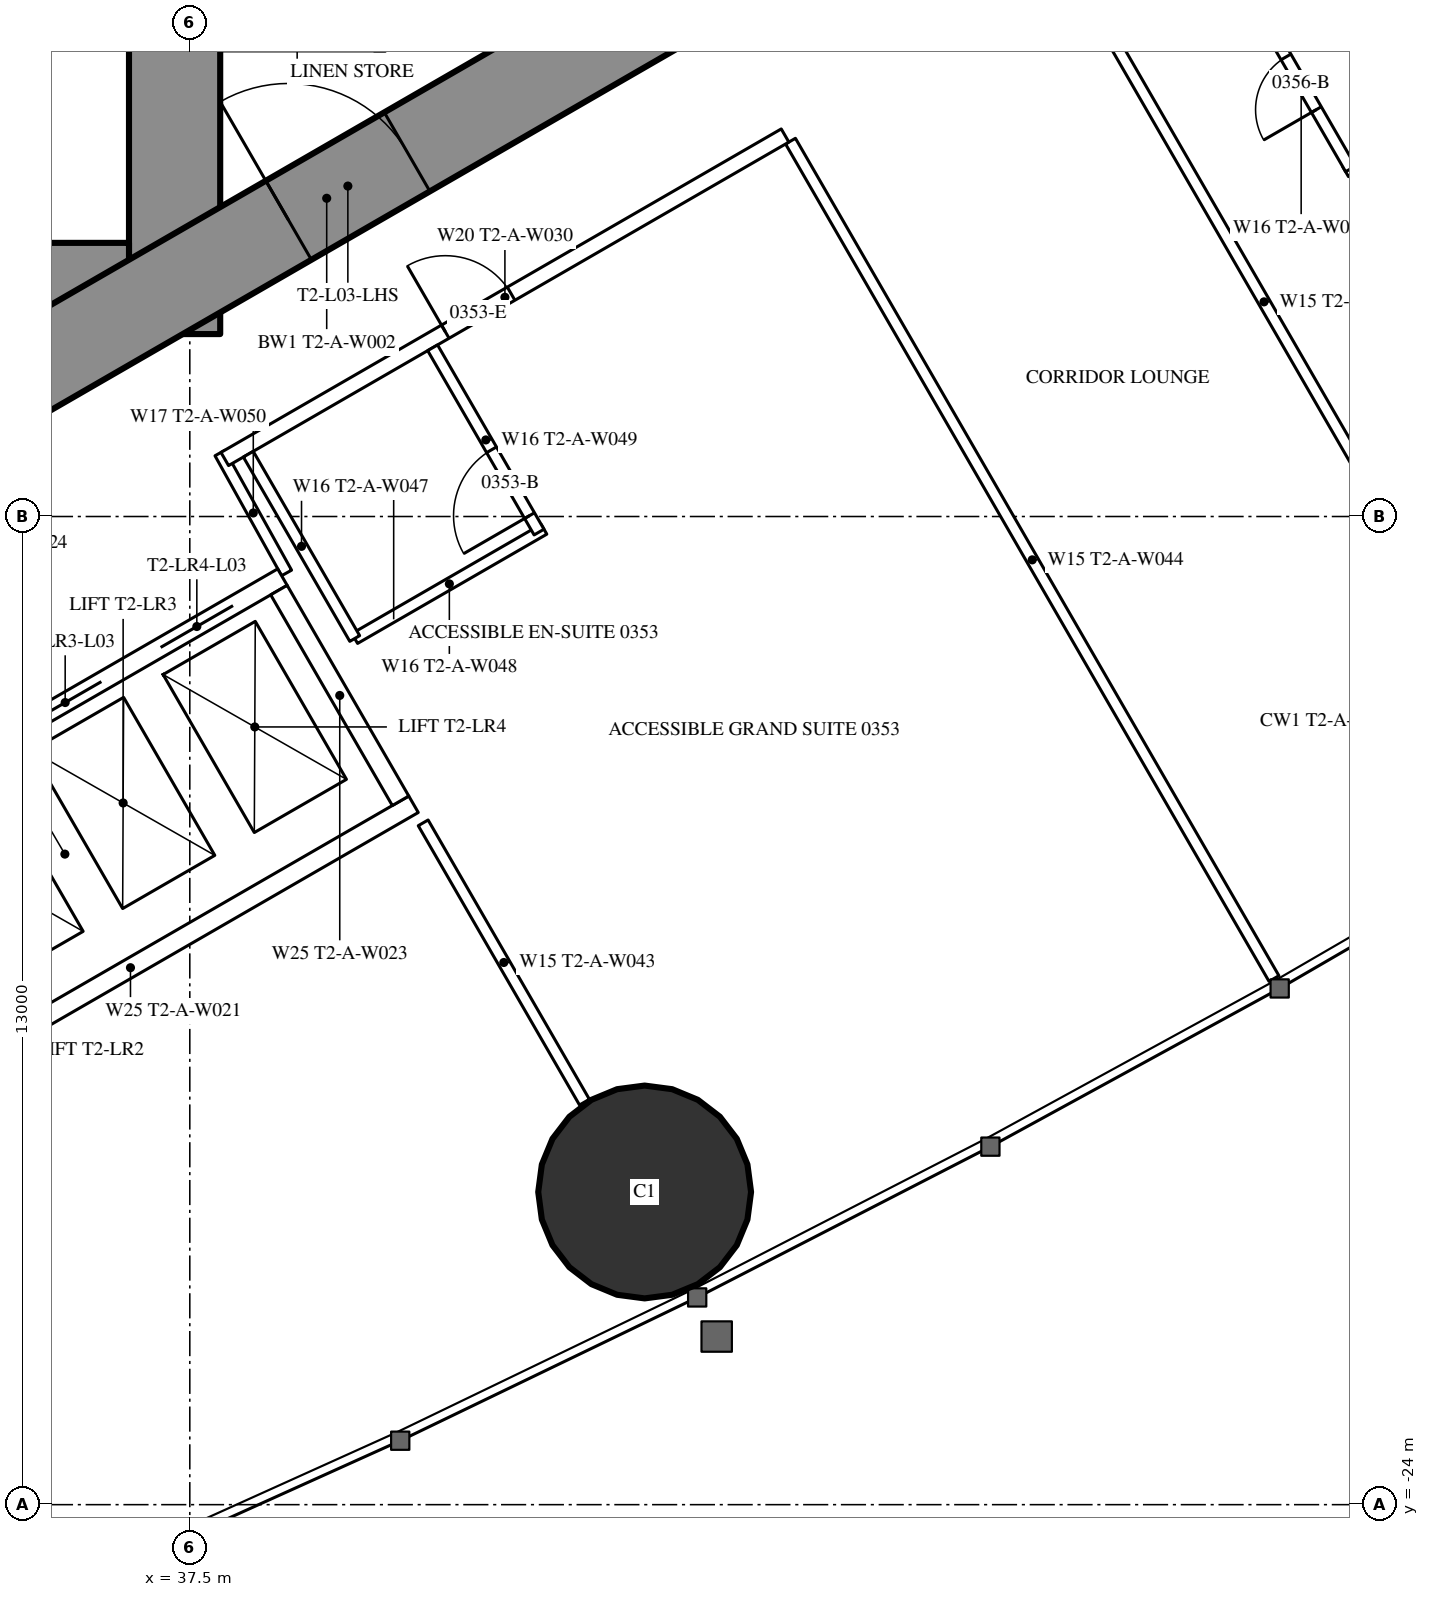
"""IFC4 building model, lengths in metres.
Left out: names, types, materials, properties, quantities, classifications, styles, units other than length and angle.
Written with IfcOpenShell. Run it as: python <this file> out.ifc"""

import sys

from ifc_helpers import new_model, si_unit, direction, frame, frame_2d, origin, origin_2d, place, context, subcontext, project, spatial, rectangle, hollow_circle, extrude, element, fill, save


model = new_model("IFC4")
c1 = context("Model", 3, precision=1e-05, world=origin(), true_north=direction((0.0, 1.0)))
c2 = subcontext(c1, "Body", "Model", "MODEL_VIEW")
j1 = project(units=[si_unit("LENGTHUNIT", "METRE"), si_unit("PLANEANGLEUNIT", "RADIAN")], contexts=[c1])
p1 = place(None, origin())
s1 = spatial("IfcSite", under=j1, at=p1, CompositionType="ELEMENT")
p2 = place(p1, origin())
s2 = spatial("IfcBuilding", under=s1, at=p2, CompositionType="ELEMENT")
p3 = place(p2, frame((0.0, 0.0, 18.0)))
s3 = spatial("IfcBuildingStorey", under=s2, at=p3, CompositionType="ELEMENT", Elevation=18.0)
p4 = place(p3, frame((43.484, -19.886, 0.0), z_axis=(0.0, 0.0, 1.0), x_axis=(1.0, 0.0, 0.0)))
e1 = element("IfcColumn", 1, at=p4, inside=s3, PredefinedType="COLUMN", context=c2, shape_type="SweptSolid", body=[
    extrude(hollow_circle(Radius=1.4, WallThickness=0.12, at=origin_2d()), origin(), (0.0, 0.0, 1.0), 3.5),
])
p5 = place(p3, frame((37.3, -8.6, 0.0), z_axis=(0.0, 0.0, 1.0), x_axis=(0.0, 1.0, 0.0)))
e2 = element("IfcWall", 2, at=p5, inside=s3, PredefinedType="SHEAR", context=c2, shape_type="SweptSolid", body=[
    extrude(rectangle(XDim=17.2, YDim=1.2, at=frame_2d((8.6, 0.0))), origin(), (0.0, 0.0, 1.0), 3.5),
])
p6 = place(p5, frame((7.7, 0.0, 0.0)))
e3 = element("IfcOpeningElement", 3, at=p6, cuts=e2, PredefinedType="OPENING", context=c2, shape_type="SweptSolid", body=[
    extrude(rectangle(XDim=1.8, YDim=2.2, at=frame_2d((0.9, 1.1))), frame((0.0, 0.61, 0.0), z_axis=(0.0, -1.0, 0.0), x_axis=(1.0, 0.0, 0.0)), (0.0, 0.0, 1.0), 1.22),
])
p7 = place(p3, frame((28.3, -8.0, 0.0), z_axis=(0.0, 0.0, 1.0), x_axis=(1.0, 0.0, 0.0)))
e4 = element("IfcWall", 4, at=p7, inside=s3, PredefinedType="SHEAR", context=c2, shape_type="SweptSolid", body=[
    extrude(rectangle(XDim=8.4, YDim=1.2, at=frame_2d((4.2, 0.0))), origin(), (0.0, 0.0, 1.0), 3.5),
])
p8 = place(p7, frame((0.25, 0.0, 0.0)))
e5 = element("IfcOpeningElement", 5, at=p8, cuts=e4, PredefinedType="OPENING", context=c2, shape_type="SweptSolid", body=[
    extrude(rectangle(XDim=1.0, YDim=2.2, at=frame_2d((0.5, 1.1))), frame((0.0, 0.61, 0.0), z_axis=(0.0, -1.0, 0.0), x_axis=(1.0, 0.0, 0.0)), (0.0, 0.0, 1.0), 1.22),
])
p9 = place(p3, frame((27.2, -13.8, 0.0), z_axis=(0.0, 0.0, 1.0), x_axis=(0.866027159892, 0.499996958321, 0.0)))
e6 = element("IfcWall", 6, at=p9, inside=s3, PredefinedType="SHEAR", context=c2, shape_type="SweptSolid", body=[
    extrude(rectangle(XDim=27.947, YDim=1.2, at=frame_2d((13.973, 0.0))), origin(), (0.0, 0.0, 1.0), 3.5),
])
p10 = place(p9, frame((4.6, 0.0, 0.0)))
e7 = element("IfcOpeningElement", 7, at=p10, cuts=e6, PredefinedType="OPENING", context=c2, shape_type="SweptSolid", body=[
    extrude(rectangle(XDim=1.0, YDim=2.2, at=frame_2d((0.5, 1.1))), frame((0.0, 0.61, 0.0), z_axis=(0.0, -1.0, 0.0), x_axis=(1.0, 0.0, 0.0)), (0.0, 0.0, 1.0), 1.22),
])
p11 = place(p9, frame((13.395, 0.0, 0.0)))
e8 = element("IfcOpeningElement", 8, at=p11, cuts=e6, PredefinedType="OPENING", context=c2, shape_type="SweptSolid", body=[
    extrude(rectangle(XDim=1.8, YDim=2.2, at=frame_2d((0.9, 1.1))), frame((0.0, 0.61, 0.0), z_axis=(0.0, -1.0, 0.0), x_axis=(1.0, 0.0, 0.0)), (0.0, 0.0, 1.0), 1.22),
])
p12 = place(p3, frame((45.403, -6.062, 0.0), z_axis=(0.0, 0.0, 1.0), x_axis=(0.500007077968, -0.866021317279, 0.0)))
e9 = element("IfcWall", 9, at=p12, inside=s3, PredefinedType="PARTITIONING", context=c2, shape_type="SweptSolid", body=[
    extrude(rectangle(XDim=12.721, YDim=0.15, at=frame_2d((6.361, 0.0))), origin(), (0.0, 0.0, 1.0), 3.25),
])
p13 = place(p3, frame((49.159, -3.893, 0.0), z_axis=(0.0, 0.0, 1.0), x_axis=(0.499998773722, -0.866026111775, 0.0)))
e10 = element("IfcWall", 10, at=p13, inside=s3, PredefinedType="PARTITIONING", context=c2, shape_type="SweptSolid", body=[
    extrude(rectangle(XDim=9.892, YDim=0.15, at=frame_2d((4.946, 0.0))), origin(), (0.0, 0.0, 1.0), 2.25),
])
p14 = place(p3, frame((40.57, -15.03, 0.0), z_axis=(0.0, 0.0, 1.0), x_axis=(0.500012993597, -0.866017901798, 0.0)))
e11 = element("IfcWall", 11, at=p14, inside=s3, PredefinedType="PARTITIONING", context=c2, shape_type="SweptSolid", body=[
    extrude(rectangle(XDim=4.243, YDim=0.15, at=frame_2d((2.122, 0.0))), origin(), (0.0, 0.0, 1.0), 3.25),
])
p15 = place(p3, frame((38.773, -11.742, 0.0), z_axis=(0.0, 0.0, 1.0), x_axis=(-0.485528096672, 0.8742210632, 0.0)))
e12 = element("IfcWall", 12, at=p15, inside=s3, PredefinedType="PARTITIONING", context=c2, shape_type="SweptSolid", body=[
    extrude(rectangle(XDim=1.805, YDim=0.15, at=frame_2d((0.903, 0.0))), origin(), (0.0, 0.0, 1.0), 3.25),
])
p16 = place(p3, frame((37.96, -10.243, 0.0), z_axis=(0.0, 0.0, 1.0), x_axis=(0.866024617314, 0.500001362204, 0.0)))
e13 = element("IfcWall", 13, at=p16, inside=s3, PredefinedType="PARTITIONING", context=c2, shape_type="SweptSolid", body=[
    extrude(rectangle(XDim=8.512, YDim=0.2, at=frame_2d((4.256, 0.0))), origin(), (0.0, 0.0, 1.0), 3.25),
])
p17 = place(p16, frame((3.35, 0.0, 0.0)))
e14 = element("IfcOpeningElement", 14, at=p17, cuts=e13, PredefinedType="OPENING", context=c2, shape_type="SweptSolid", body=[
    extrude(rectangle(XDim=1.0, YDim=2.2, at=frame_2d((0.5, 1.1))), frame((0.0, 0.11, 0.0), z_axis=(0.0, -1.0, 0.0), x_axis=(1.0, 0.0, 0.0)), (0.0, 0.0, 1.0), 0.22),
])
p18 = place(p3, frame((52.706, -6.464, 0.0), z_axis=(0.0, 0.0, 1.0), x_axis=(0.86604923931, 0.499958713387, 0.0)))
e15 = element("IfcWall", 15, at=p18, inside=s3, PredefinedType="PARTITIONING", context=c2, shape_type="SweptSolid", body=[
    extrude(rectangle(XDim=2.475, YDim=0.15, at=frame_2d((1.237, 0.0))), origin(), (0.0, 0.0, 1.0), 3.25),
])
p19 = place(p3, frame((51.471, -4.175, 0.0), z_axis=(0.0, 0.0, 1.0), x_axis=(0.500006934395, -0.866021400173, 0.0)))
e16 = element("IfcWall", 16, at=p19, inside=s3, PredefinedType="PARTITIONING", context=c2, shape_type="SweptSolid", body=[
    extrude(rectangle(XDim=2.6, YDim=0.15, at=frame_2d((1.3, 0.0))), origin(), (0.0, 0.0, 1.0), 3.25),
])
p20 = place(p19, frame((0.9, 0.0, 0.0)))
e17 = element("IfcOpeningElement", 17, at=p20, cuts=e16, PredefinedType="OPENING", context=c2, shape_type="SweptSolid", body=[
    extrude(rectangle(XDim=0.8, YDim=2.2, at=frame_2d((0.4, 1.1))), frame((0.0, 0.085, 0.0), z_axis=(0.0, -1.0, 0.0), x_axis=(1.0, 0.0, 0.0)), (0.0, 0.0, 1.0), 0.17),
])
p21 = place(p3, frame((39.67, -12.605, 0.0), z_axis=(0.0, 0.0, 1.0), x_axis=(0.866018712932, 0.500011588718, 0.0)))
e18 = element("IfcWall", 18, at=p21, inside=s3, PredefinedType="PARTITIONING", context=c2, shape_type="SweptSolid", body=[
    extrude(rectangle(XDim=2.875, YDim=0.15, at=frame_2d((1.438, 0.0))), origin(), (0.0, 0.0, 1.0), 3.25),
])
p22 = place(p3, frame((40.695, -8.78, 0.0), z_axis=(0.0, 0.0, 1.0), x_axis=(0.500049511043, -0.865996816683, 0.0)))
e19 = element("IfcWall", 19, at=p22, inside=s3, PredefinedType="PARTITIONING", context=c2, shape_type="SweptSolid", body=[
    extrude(rectangle(XDim=2.8, YDim=0.15, at=frame_2d((1.4, 0.0))), origin(), (0.0, 0.0, 1.0), 3.25),
])
p23 = place(p22, frame((1.55, 0.0, 0.0)))
e20 = element("IfcOpeningElement", 20, at=p23, cuts=e19, PredefinedType="OPENING", context=c2, shape_type="SweptSolid", body=[
    extrude(rectangle(XDim=1.0, YDim=2.2, at=frame_2d((0.5, 1.1))), frame((0.0, 0.085, 0.0), z_axis=(0.0, -1.0, 0.0), x_axis=(1.0, 0.0, 0.0)), (0.0, 0.0, 1.0), 0.17),
])
p24 = place(p3, frame((38.27, -10.18, 0.0), z_axis=(0.0, 0.0, 1.0), x_axis=(0.500049511043, -0.865996816683, 0.0)))
e21 = element("IfcWall", 21, at=p24, inside=s3, PredefinedType="PARTITIONING", context=c2, shape_type="SweptSolid", body=[
    extrude(rectangle(XDim=2.8, YDim=0.15, at=frame_2d((1.4, 0.0))), origin(), (0.0, 0.0, 1.0), 3.25),
])
p25 = place(p3, frame((31.271, -16.097, 0.0), z_axis=(0.0, 0.0, 1.0), x_axis=(0.86604045752, 0.499973925258, 0.0)))
e22 = element("IfcWall", 22, at=p25, inside=s3, PredefinedType="PARTITIONING", context=c2, shape_type="SweptSolid", body=[
    extrude(rectangle(XDim=8.6, YDim=0.25, at=frame_2d((4.3, 0.0))), origin(), (0.0, 0.0, 1.0), 3.25),
])
p26 = place(p25, frame((0.75, 0.0, 0.0)))
e23 = element("IfcOpeningElement", 23, at=p26, cuts=e22, PredefinedType="OPENING", context=c2, shape_type="SweptSolid", body=[
    extrude(rectangle(XDim=1.1, YDim=2.2, at=frame_2d((0.55, 1.1))), frame((0.0, 0.135, 0.0), z_axis=(0.0, -1.0, 0.0), x_axis=(1.0, 0.0, 0.0)), (0.0, 0.0, 1.0), 0.27),
])
p27 = place(p25, frame((2.75, 0.0, 0.0)))
e24 = element("IfcOpeningElement", 24, at=p27, cuts=e22, PredefinedType="OPENING", context=c2, shape_type="SweptSolid", body=[
    extrude(rectangle(XDim=1.1, YDim=2.2, at=frame_2d((0.55, 1.1))), frame((0.0, 0.135, 0.0), z_axis=(0.0, -1.0, 0.0), x_axis=(1.0, 0.0, 0.0)), (0.0, 0.0, 1.0), 0.27),
])
p28 = place(p25, frame((4.75, 0.0, 0.0)))
e25 = element("IfcOpeningElement", 25, at=p28, cuts=e22, PredefinedType="OPENING", context=c2, shape_type="SweptSolid", body=[
    extrude(rectangle(XDim=1.1, YDim=2.2, at=frame_2d((0.55, 1.1))), frame((0.0, 0.135, 0.0), z_axis=(0.0, -1.0, 0.0), x_axis=(1.0, 0.0, 0.0)), (0.0, 0.0, 1.0), 0.27),
])
p29 = place(p25, frame((6.75, 0.0, 0.0)))
e26 = element("IfcOpeningElement", 26, at=p29, cuts=e22, PredefinedType="OPENING", context=c2, shape_type="SweptSolid", body=[
    extrude(rectangle(XDim=1.1, YDim=2.2, at=frame_2d((0.55, 1.1))), frame((0.0, 0.135, 0.0), z_axis=(0.0, -1.0, 0.0), x_axis=(1.0, 0.0, 0.0)), (0.0, 0.0, 1.0), 0.27),
])
p30 = place(p3, frame((32.996, -19.086, 0.0), z_axis=(0.0, 0.0, 1.0), x_axis=(0.866028165386, 0.499995216735, 0.0)))
e27 = element("IfcWall", 27, at=p30, inside=s3, PredefinedType="PARTITIONING", context=c2, shape_type="SweptSolid", body=[
    extrude(rectangle(XDim=8.6, YDim=0.25, at=frame_2d((4.3, 0.0))), origin(), (0.0, 0.0, 1.0), 3.25),
])
p31 = place(p3, frame((38.673, -11.968, 0.0), z_axis=(0.0, 0.0, 1.0), x_axis=(0.499929347863, -0.866066190972, 0.0)))
e28 = element("IfcWall", 28, at=p31, inside=s3, PredefinedType="PARTITIONING", context=c2, shape_type="SweptSolid", body=[
    extrude(rectangle(XDim=3.201, YDim=0.25, at=frame_2d((1.6, 0.0))), origin(), (0.0, 0.0, 1.0), 3.25),
])
p32 = place(p20, origin())
e29 = element("IfcDoor", 29, at=p32, inside=s3, OperationType="SINGLE_SWING_RIGHT", PredefinedType="DOOR", context=c2, shape_type="SweptSolid", body=[
    extrude(rectangle(XDim=0.8, YDim=2.2, at=frame_2d((0.4, 1.1))), frame((0.0, 0.025, 0.0), z_axis=(0.0, -1.0, 0.0), x_axis=(1.0, 0.0, 0.0)), (0.0, 0.0, 1.0), 0.05),
])
fill(e17, e29)
p33 = place(p23, origin())
e30 = element("IfcDoor", 30, at=p33, inside=s3, OperationType="SINGLE_SWING_RIGHT", PredefinedType="DOOR", context=c2, shape_type="SweptSolid", body=[
    extrude(rectangle(XDim=1.0, YDim=2.2, at=frame_2d((0.5, 1.1))), frame((0.0, 0.025, 0.0), z_axis=(0.0, -1.0, 0.0), x_axis=(1.0, 0.0, 0.0)), (0.0, 0.0, 1.0), 0.05),
])
fill(e20, e30)
p34 = place(p17, origin())
e31 = element("IfcDoor", 31, at=p34, inside=s3, OperationType="SINGLE_SWING_LEFT", PredefinedType="DOOR", context=c2, shape_type="SweptSolid", body=[
    extrude(rectangle(XDim=1.0, YDim=2.2, at=frame_2d((0.5, 1.1))), frame((0.0, 0.025, 0.0), z_axis=(0.0, -1.0, 0.0), x_axis=(1.0, 0.0, 0.0)), (0.0, 0.0, 1.0), 0.05),
])
fill(e14, e31)
p35 = place(p11, origin())
e32 = element("IfcDoor", 32, at=p35, inside=s3, OperationType="DOUBLE_DOOR_SINGLE_SWING", PredefinedType="DOOR", context=c2, shape_type="SweptSolid", body=[
    extrude(rectangle(XDim=1.8, YDim=2.2, at=frame_2d((0.9, 1.1))), frame((0.0, 0.025, 0.0), z_axis=(0.0, -1.0, 0.0), x_axis=(1.0, 0.0, 0.0)), (0.0, 0.0, 1.0), 0.05),
])
fill(e8, e32)
p36 = place(p28, origin())
e33 = element("IfcDoor", 33, at=p36, inside=s3, OperationType="DOUBLE_DOOR_SLIDING", PredefinedType="USERDEFINED", context=c2, shape_type="SweptSolid", body=[
    extrude(rectangle(XDim=1.1, YDim=2.2, at=frame_2d((0.55, 1.1))), frame((0.0, 0.025, 0.0), z_axis=(0.0, -1.0, 0.0), x_axis=(1.0, 0.0, 0.0)), (0.0, 0.0, 1.0), 0.05),
])
fill(e25, e33)
p37 = place(p29, origin())
e34 = element("IfcDoor", 34, at=p37, inside=s3, OperationType="DOUBLE_DOOR_SLIDING", PredefinedType="USERDEFINED", context=c2, shape_type="SweptSolid", body=[
    extrude(rectangle(XDim=1.1, YDim=2.2, at=frame_2d((0.55, 1.1))), frame((0.0, 0.025, 0.0), z_axis=(0.0, -1.0, 0.0), x_axis=(1.0, 0.0, 0.0)), (0.0, 0.0, 1.0), 0.05),
])
fill(e26, e34)
save(model, sys.argv[1])
